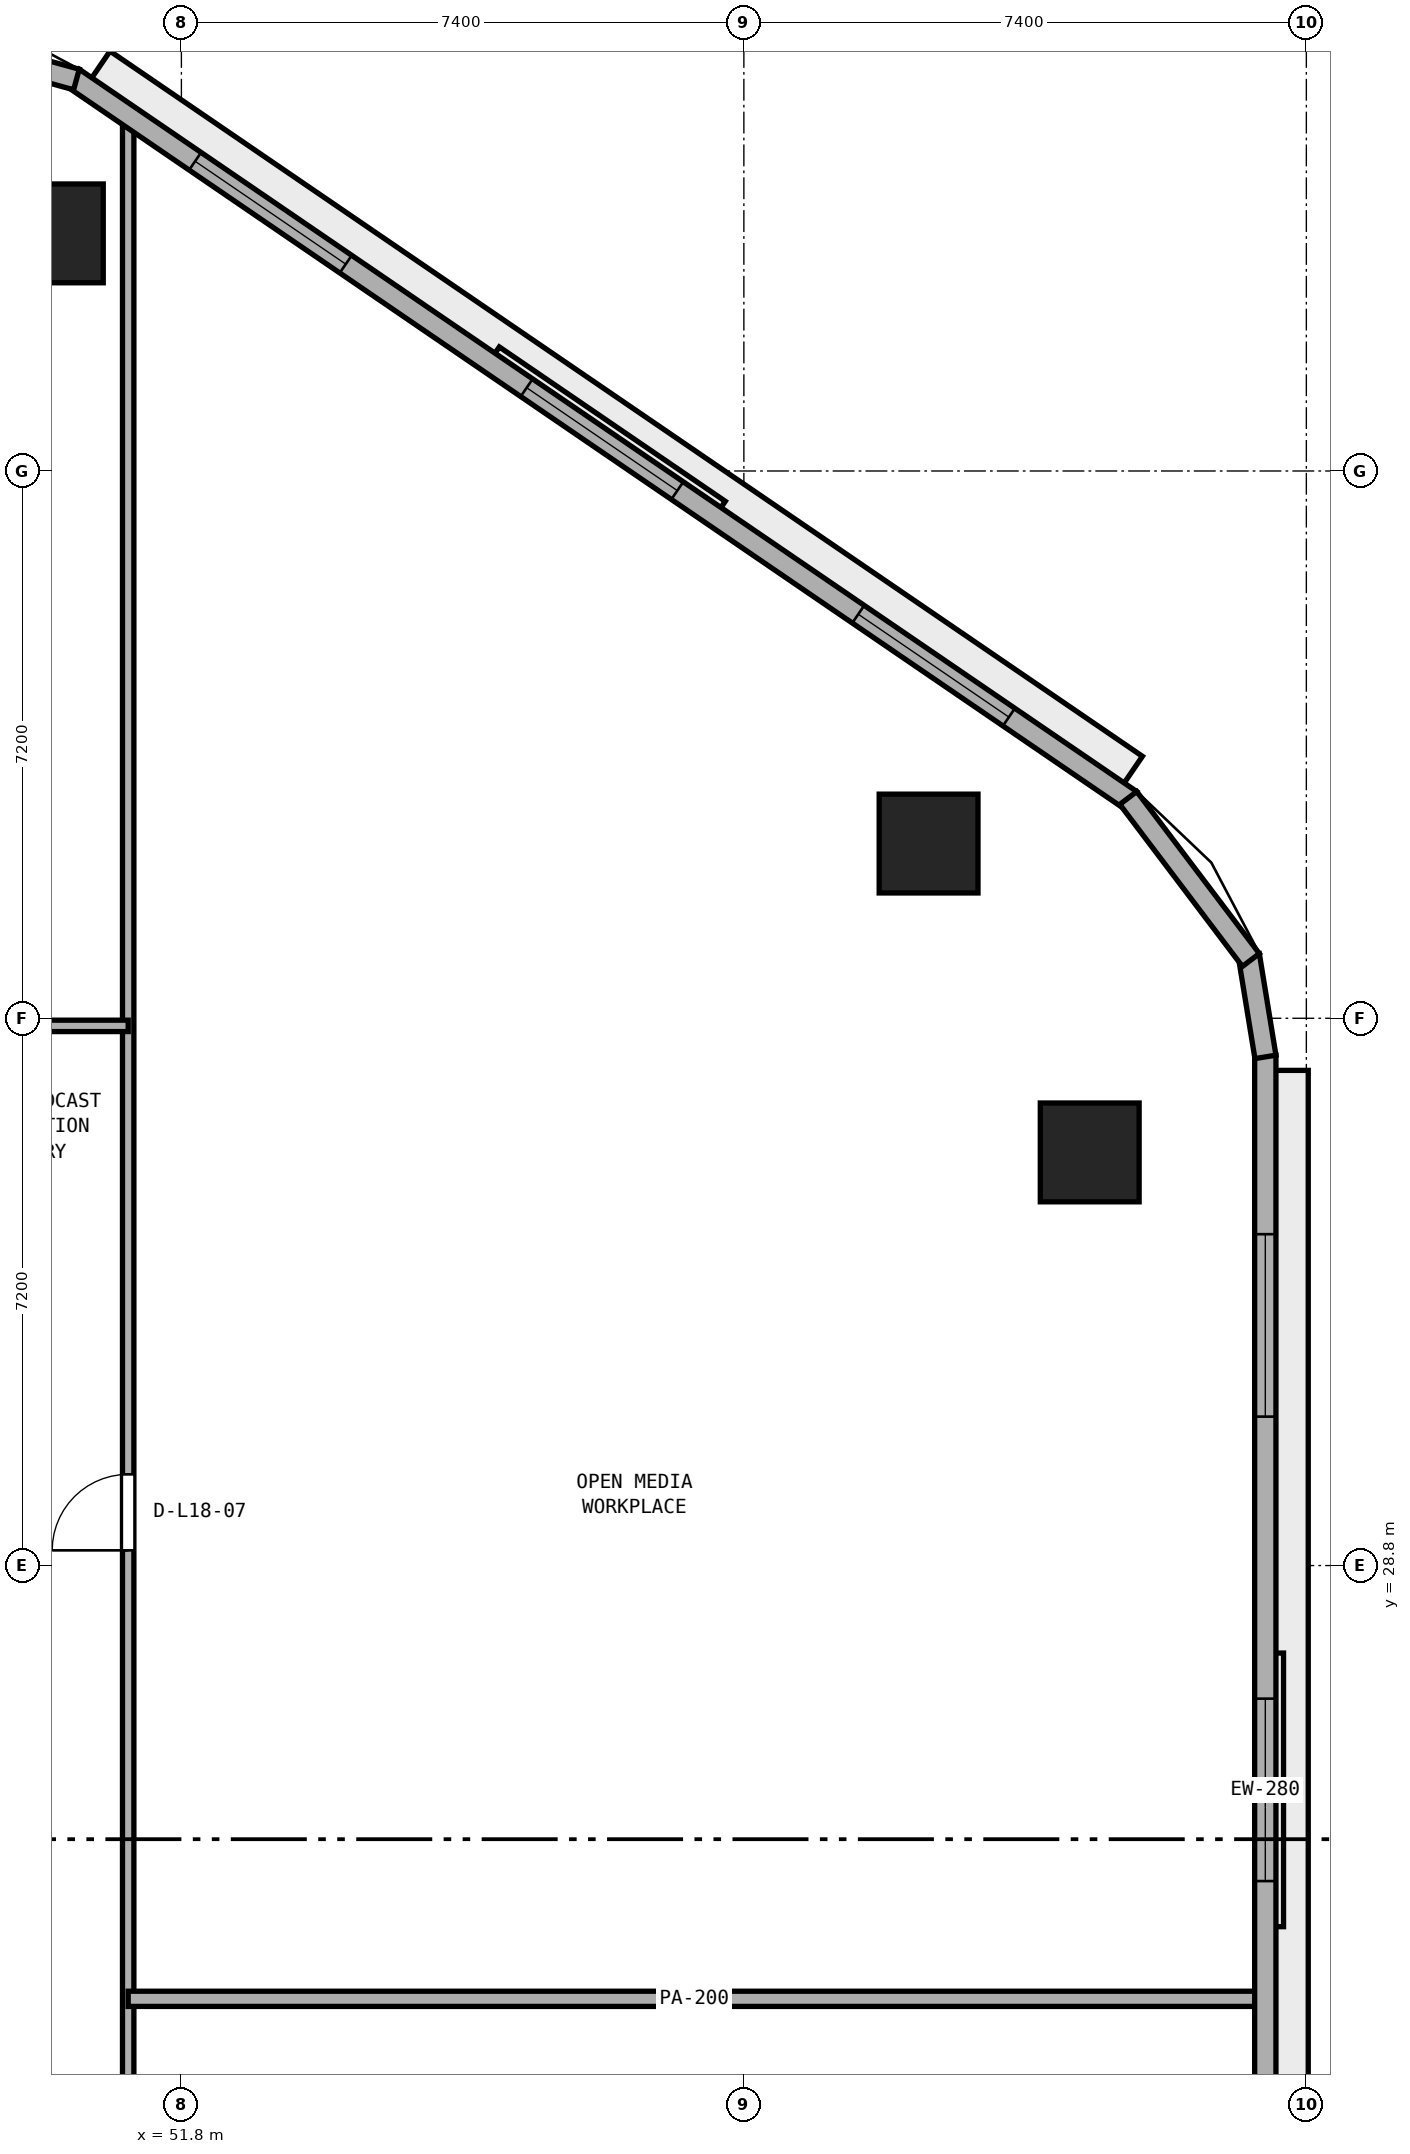
"""IFC4 building model, lengths in metres.
Left out: names, types, materials, properties, quantities, classifications, styles, units other than length and angle.
Written with IfcOpenShell. Run it as: python <this file> out.ifc"""

import sys

from ifc_helpers import new_model, si_unit, direction, frame, frame_2d, origin, origin_2d, place, context, subcontext, project, spatial, rectangle, extrude, element, fill, save


model = new_model("IFC4")
c1 = context("Model", 3, precision=1e-05, world=origin(), true_north=direction((0.0, 1.0)))
c2 = subcontext(c1, "Body", "Model", "MODEL_VIEW")
j1 = project(units=[si_unit("LENGTHUNIT", "METRE"), si_unit("PLANEANGLEUNIT", "RADIAN")], contexts=[c1])
p1 = place(None, origin())
s1 = spatial("IfcSite", under=j1, at=p1, CompositionType="ELEMENT")
p2 = place(p1, origin())
s2 = spatial("IfcBuilding", under=s1, at=p2, CompositionType="ELEMENT")
p3 = place(p2, frame((0.0, 0.0, 74.4)))
s3 = spatial("IfcBuildingStorey", under=s2, at=p3, CompositionType="ELEMENT", Elevation=74.4)
for number, where, z_axis, x_axis in (
    (1, (63.75, 34.235, 0.0), (0.0, 0.0, 1.0), (1.0, 0.0, 0.0)),
    (2, (61.63, 38.299, 0.0), (0.0, 0.0, 1.0), (1.0, 0.0, 0.0)),
    (3, (50.122, 46.326, 0.0), (0.0, 0.0, 1.0), (1.0, 0.0, 0.0)),
):
    element("IfcColumn", number, at=place(p3, frame(where, z_axis=z_axis, x_axis=x_axis)), inside=s3, PredefinedType="COLUMN", context=c2, shape_type="SweptSolid", body=[
        extrude(rectangle(XDim=1.3, YDim=1.3, at=origin_2d()), origin(), (0.0, 0.0, 1.0), 3.8),
    ])
p4 = place(p3, frame((51.1, 2.651, 0.0), z_axis=(0.0, 0.0, 1.0), x_axis=(0.0, 1.0, 0.0)))
e4 = element("IfcWall", 4, at=p4, inside=s3, PredefinedType="PARTITIONING", context=c2, shape_type="SweptSolid", body=[
    extrude(rectangle(XDim=45.255, YDim=0.15, at=frame_2d((22.627, 0.0))), origin(), (0.0, 0.0, 1.0), 3.525),
])
p5 = place(p4, frame((15.699, 0.0, 0.0)))
e5 = element("IfcOpeningElement", 5, at=p5, cuts=e4, PredefinedType="OPENING", context=c2, shape_type="SweptSolid", body=[
    extrude(rectangle(XDim=0.9, YDim=2.1, at=frame_2d((0.45, 1.05))), frame((0.0, 0.085, 0.0), z_axis=(0.0, -1.0, 0.0), x_axis=(1.0, 0.0, 0.0)), (0.0, 0.0, 1.0), 0.17),
])
p6 = place(p4, frame((26.349, 0.0, 0.0)))
e6 = element("IfcOpeningElement", 6, at=p6, cuts=e4, PredefinedType="OPENING", context=c2, shape_type="SweptSolid", body=[
    extrude(rectangle(XDim=1.0, YDim=2.12, at=frame_2d((0.5, 1.06))), frame((0.0, 0.085, 0.0), z_axis=(0.0, -1.0, 0.0), x_axis=(1.0, 0.0, 0.0)), (0.0, 0.0, 1.0), 0.17),
])
p7 = place(p3, frame((51.1, 23.1, 0.0), z_axis=(0.0, 0.0, 1.0), x_axis=(1.0, 0.0, 0.0)))
e7 = element("IfcWall", 7, at=p7, inside=s3, PredefinedType="PARTITIONING", context=c2, shape_type="SweptSolid", body=[
    extrude(rectangle(XDim=14.895, YDim=0.2, at=frame_2d((7.448, 0.0))), origin(), (0.0, 0.0, 1.0), 3.525),
])
p8 = place(p3, frame((22.9, 35.9, 0.0), z_axis=(0.0, 0.0, 1.0), x_axis=(1.0, 0.0, 0.0)))
e8 = element("IfcWall", 8, at=p8, inside=s3, PredefinedType="PARTITIONING", context=c2, shape_type="SweptSolid", body=[
    extrude(rectangle(XDim=28.2, YDim=0.15, at=frame_2d((14.1, 0.0))), origin(), (0.0, 0.0, 1.0), 3.525),
])
p9 = place(p8, frame((13.6, 0.0, 0.0)))
e9 = element("IfcOpeningElement", 9, at=p9, cuts=e8, PredefinedType="OPENING", context=c2, shape_type="SweptSolid", body=[
    extrude(rectangle(XDim=1.0, YDim=2.12, at=frame_2d((0.5, 1.06))), frame((0.0, 0.085, 0.0), z_axis=(0.0, -1.0, 0.0), x_axis=(1.0, 0.0, 0.0)), (0.0, 0.0, 1.0), 0.17),
])
p10 = place(p3, frame((66.06, 16.183, 0.0), z_axis=(0.0, 0.0, 1.0), x_axis=(0.0, 1.0, 0.0)))
e10 = element("IfcWall", 10, at=p10, inside=s3, PredefinedType="STANDARD", context=c2, shape_type="SweptSolid", body=[
    extrude(rectangle(XDim=19.331, YDim=0.28, at=frame_2d((9.666, 0.0))), origin(), (0.0, 0.0, 1.0), 3.525),
])
p11 = place(p10, frame((2.355, 0.0, 0.9)))
e11 = element("IfcOpeningElement", 11, at=p11, cuts=e10, PredefinedType="OPENING", context=c2, shape_type="SweptSolid", body=[
    extrude(rectangle(XDim=2.4, YDim=1.75, at=frame_2d((1.2, 0.875))), frame((0.0, 0.15, 0.0), z_axis=(0.0, -1.0, 0.0), x_axis=(1.0, 0.0, 0.0)), (0.0, 0.0, 1.0), 0.3),
])
p12 = place(p10, frame((8.466, 0.0, 0.9)))
e12 = element("IfcOpeningElement", 12, at=p12, cuts=e10, PredefinedType="OPENING", context=c2, shape_type="SweptSolid", body=[
    extrude(rectangle(XDim=2.4, YDim=1.75, at=frame_2d((1.2, 0.875))), frame((0.0, 0.15, 0.0), z_axis=(0.0, -1.0, 0.0), x_axis=(1.0, 0.0, 0.0)), (0.0, 0.0, 1.0), 0.3),
])
p13 = place(p10, frame((14.576, 0.0, 0.9)))
e13 = element("IfcOpeningElement", 13, at=p13, cuts=e10, PredefinedType="OPENING", context=c2, shape_type="SweptSolid", body=[
    extrude(rectangle(XDim=2.4, YDim=1.75, at=frame_2d((1.2, 0.875))), frame((0.0, 0.15, 0.0), z_axis=(0.0, -1.0, 0.0), x_axis=(1.0, 0.0, 0.0)), (0.0, 0.0, 1.0), 0.3),
])
p14 = place(p3, frame((64.29, 38.867, 0.0), z_axis=(0.0, 0.0, 1.0), x_axis=(-0.825755550159, 0.564028165416, 0.0)))
e14 = element("IfcWall", 14, at=p14, inside=s3, PredefinedType="STANDARD", context=c2, shape_type="SweptSolid", body=[
    extrude(rectangle(XDim=16.848, YDim=0.28, at=frame_2d((8.424, 0.0))), origin(), (0.0, 0.0, 1.0), 3.525),
])
p15 = place(p14, frame((1.941, 0.0, 0.9)))
e15 = element("IfcOpeningElement", 15, at=p15, cuts=e14, PredefinedType="OPENING", context=c2, shape_type="SweptSolid", body=[
    extrude(rectangle(XDim=2.4, YDim=1.75, at=frame_2d((1.2, 0.875))), frame((0.0, 0.15, 0.0), z_axis=(0.0, -1.0, 0.0), x_axis=(1.0, 0.0, 0.0)), (0.0, 0.0, 1.0), 0.3),
])
p16 = place(p14, frame((7.224, 0.0, 0.9)))
e16 = element("IfcOpeningElement", 16, at=p16, cuts=e14, PredefinedType="OPENING", context=c2, shape_type="SweptSolid", body=[
    extrude(rectangle(XDim=2.4, YDim=1.75, at=frame_2d((1.2, 0.875))), frame((0.0, 0.15, 0.0), z_axis=(0.0, -1.0, 0.0), x_axis=(1.0, 0.0, 0.0)), (0.0, 0.0, 1.0), 0.3),
])
p17 = place(p14, frame((12.507, 0.0, 0.9)))
e17 = element("IfcOpeningElement", 17, at=p17, cuts=e14, PredefinedType="OPENING", context=c2, shape_type="SweptSolid", body=[
    extrude(rectangle(XDim=2.4, YDim=1.75, at=frame_2d((1.2, 0.875))), frame((0.0, 0.15, 0.0), z_axis=(0.0, -1.0, 0.0), x_axis=(1.0, 0.0, 0.0)), (0.0, 0.0, 1.0), 0.3),
])
p18 = place(p3, frame((66.062, 35.492, 0.0), z_axis=(0.0, 0.0, 1.0), x_axis=(-0.161182073582, 0.986924687682, 0.0)))
e18 = element("IfcWall", 18, at=p18, inside=s3, PredefinedType="STANDARD", context=c2, shape_type="SweptSolid", body=[
    extrude(rectangle(XDim=1.354, YDim=0.28, at=frame_2d((0.677, 0.0))), origin(), (0.0, 0.0, 1.0), 3.525),
])
p19 = place(p3, frame((65.87, 36.767, 0.0), z_axis=(0.0, 0.0, 1.0), x_axis=(-0.603370463754, 0.797461023166, 0.0)))
e19 = element("IfcWall", 19, at=p19, inside=s3, PredefinedType="STANDARD", context=c2, shape_type="SweptSolid", body=[
    extrude(rectangle(XDim=2.673, YDim=0.28, at=frame_2d((1.336, 0.0))), origin(), (0.0, 0.0, 1.0), 3.525),
])
p20 = place(p3, frame((50.419, 48.351, 0.0), z_axis=(0.0, 0.0, 1.0), x_axis=(-0.964254516967, 0.264977784933, 0.0)))
e20 = element("IfcWall", 20, at=p20, inside=s3, PredefinedType="STANDARD", context=c2, shape_type="SweptSolid", body=[
    extrude(rectangle(XDim=2.731, YDim=0.28, at=frame_2d((1.365, 0.0))), origin(), (0.0, 0.0, 1.0), 3.525),
])
p21 = place(p6, origin())
e21 = element("IfcDoor", 21, at=p21, inside=s3, OperationType="SINGLE_SWING_LEFT", PredefinedType="DOOR", context=c2, shape_type="SweptSolid", body=[
    extrude(rectangle(XDim=1.0, YDim=2.12, at=frame_2d((0.5, 1.06))), frame((0.0, 0.025, 0.0), z_axis=(0.0, -1.0, 0.0), x_axis=(1.0, 0.0, 0.0)), (0.0, 0.0, 1.0), 0.05),
])
fill(e6, e21)
p22 = place(p12, origin())
e22 = element("IfcWindow", 22, at=p22, inside=s3, PartitioningType="SINGLE_PANEL", PredefinedType="WINDOW", context=c2, shape_type="SweptSolid", body=[
    extrude(rectangle(XDim=2.4, YDim=1.75, at=frame_2d((1.2, 0.875))), frame((0.0, 0.03, 0.0), z_axis=(0.0, -1.0, 0.0), x_axis=(1.0, 0.0, 0.0)), (0.0, 0.0, 1.0), 0.06),
])
fill(e12, e22)
p23 = place(p13, origin())
e23 = element("IfcWindow", 23, at=p23, inside=s3, PartitioningType="SINGLE_PANEL", PredefinedType="WINDOW", context=c2, shape_type="SweptSolid", body=[
    extrude(rectangle(XDim=2.4, YDim=1.75, at=frame_2d((1.2, 0.875))), frame((0.0, 0.03, 0.0), z_axis=(0.0, -1.0, 0.0), x_axis=(1.0, 0.0, 0.0)), (0.0, 0.0, 1.0), 0.06),
])
fill(e13, e23)
p24 = place(p15, origin())
e24 = element("IfcWindow", 24, at=p24, inside=s3, PartitioningType="SINGLE_PANEL", PredefinedType="WINDOW", context=c2, shape_type="SweptSolid", body=[
    extrude(rectangle(XDim=2.4, YDim=1.75, at=frame_2d((1.2, 0.875))), frame((0.0, 0.03, 0.0), z_axis=(0.0, -1.0, 0.0), x_axis=(1.0, 0.0, 0.0)), (0.0, 0.0, 1.0), 0.06),
])
fill(e15, e24)
p25 = place(p16, origin())
e25 = element("IfcWindow", 25, at=p25, inside=s3, PartitioningType="SINGLE_PANEL", PredefinedType="WINDOW", context=c2, shape_type="SweptSolid", body=[
    extrude(rectangle(XDim=2.4, YDim=1.75, at=frame_2d((1.2, 0.875))), frame((0.0, 0.03, 0.0), z_axis=(0.0, -1.0, 0.0), x_axis=(1.0, 0.0, 0.0)), (0.0, 0.0, 1.0), 0.06),
])
fill(e16, e25)
p26 = place(p17, origin())
e26 = element("IfcWindow", 26, at=p26, inside=s3, PartitioningType="SINGLE_PANEL", PredefinedType="WINDOW", context=c2, shape_type="SweptSolid", body=[
    extrude(rectangle(XDim=2.4, YDim=1.75, at=frame_2d((1.2, 0.875))), frame((0.0, 0.03, 0.0), z_axis=(0.0, -1.0, 0.0), x_axis=(1.0, 0.0, 0.0)), (0.0, 0.0, 1.0), 0.06),
])
fill(e17, e26)
save(model, sys.argv[1])
